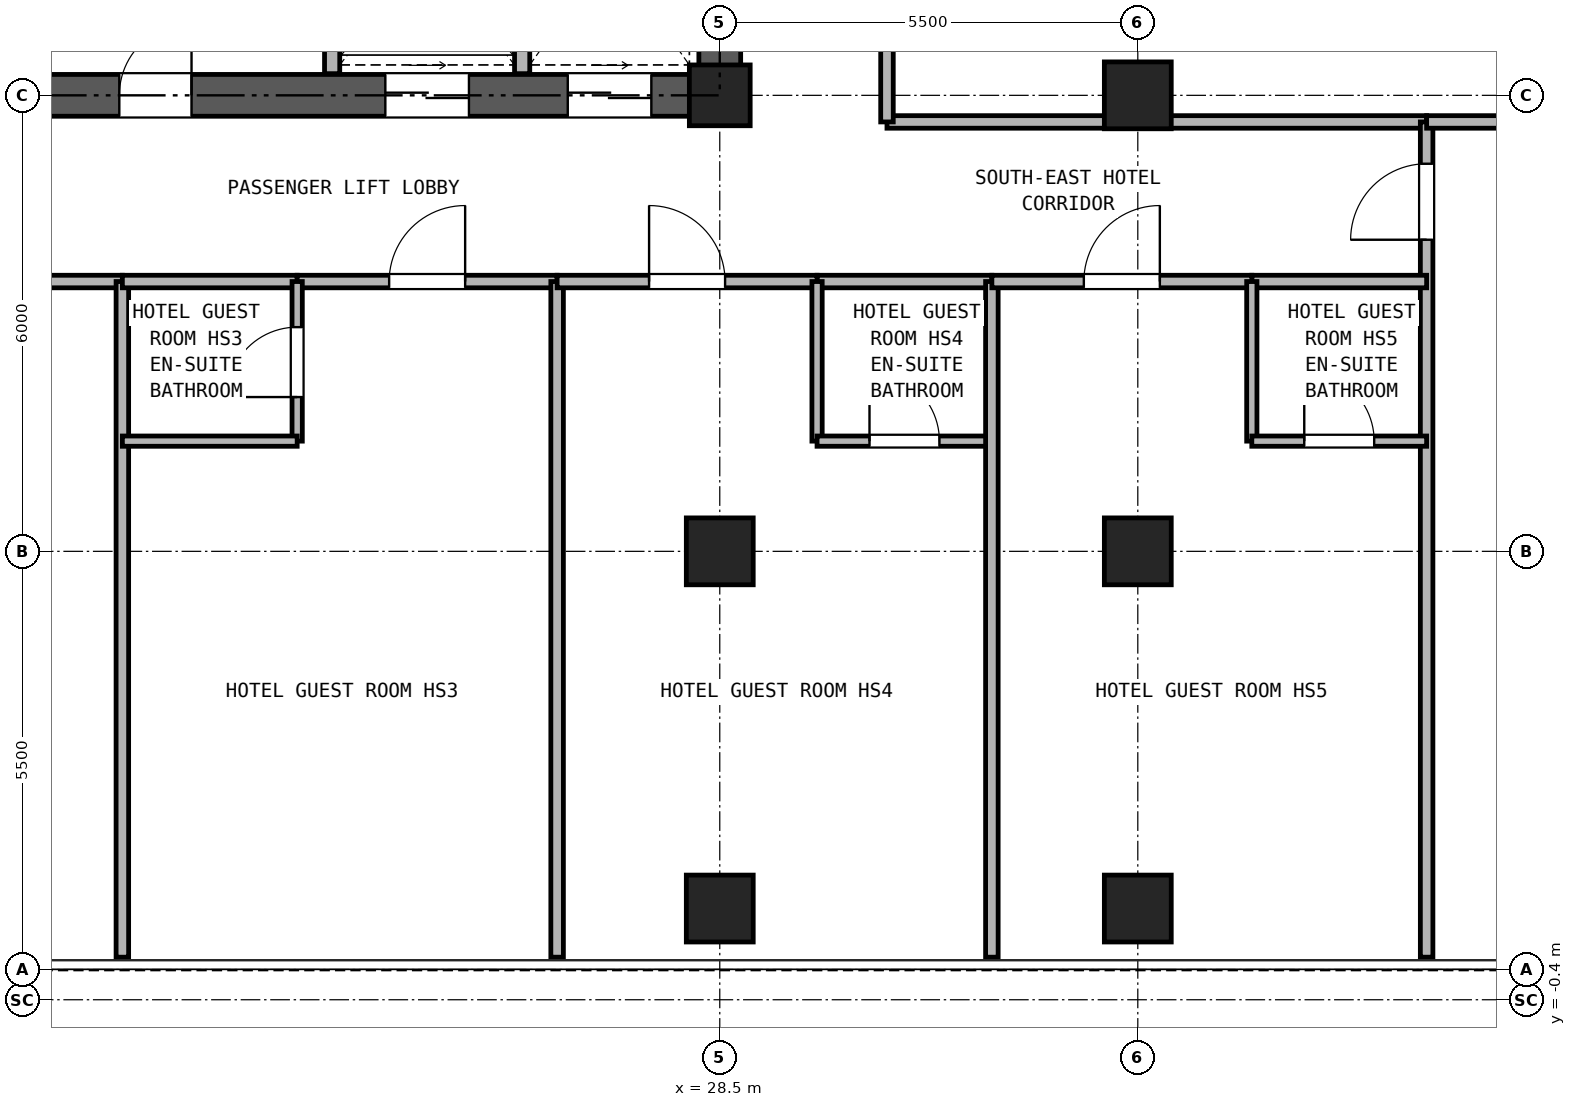
"""IFC4 building model, lengths in metres.
Left out: names, types, materials, properties, quantities, classifications, styles, units other than length and angle.
Written with IfcOpenShell. Run it as: python <this file> out.ifc"""

import sys

from ifc_helpers import new_model, si_unit, direction, frame, frame_2d, origin, origin_2d, place, context, subcontext, project, spatial, rectangle, hollow_rectangle, extrude, source, transform, mapped, element, fill, save


model = new_model("IFC4")
c1 = context("Model", 3, precision=1e-05, world=origin(), true_north=direction((0.0, 1.0)))
c2 = subcontext(c1, "Body", "Model", "MODEL_VIEW")
j1 = project(units=[si_unit("LENGTHUNIT", "METRE"), si_unit("PLANEANGLEUNIT", "RADIAN")], contexts=[c1])
p1 = place(None, origin())
s1 = spatial("IfcSite", under=j1, at=p1, CompositionType="ELEMENT")
p2 = place(p1, origin())
s2 = spatial("IfcBuilding", under=s1, at=p2, CompositionType="ELEMENT")
p3 = place(p2, frame((0.0, 0.0, 99.1)))
s3 = spatial("IfcBuildingStorey", under=s2, at=p3, CompositionType="ELEMENT", Elevation=99.1)
m1 = source(origin(), c2, "Body", "SweptSolid", [
    extrude(hollow_rectangle(XDim=0.88, YDim=0.88, WallThickness=0.05, at=origin_2d()), origin(), (0.0, 0.0, 1.0), 2.95),
])
for number, where, z_axis, x_axis in (
    (1, (28.5, 0.8, 0.0), (0.0, 0.0, 1.0), (1.0, 0.0, 0.0)),
    (2, (34.0, 0.8, 0.0), (0.0, 0.0, 1.0), (1.0, 0.0, 0.0)),
    (3, (28.5, 5.5, 0.0), (0.0, 0.0, 1.0), (1.0, 0.0, 0.0)),
):
    element("IfcColumn", number, at=place(p3, frame(where, z_axis=z_axis, x_axis=x_axis)), inside=s3, PredefinedType="COLUMN", context=c2, shape_type="MappedRepresentation", body=[
        mapped(m1, transform((0.0, 0.0, 0.0), x_axis=(1.0, 0.0, 0.0), y_axis=(0.0, 1.0, 0.0), z_axis=(0.0, 0.0, 1.0), scale=1.0)),
    ])
m2 = source(origin(), c2, "Body", "SweptSolid", [
    extrude(hollow_rectangle(XDim=0.8, YDim=0.8, WallThickness=0.045, at=origin_2d()), origin(), (0.0, 0.0, 1.0), 2.95),
])
p4 = place(p3, frame((28.5, 11.5, 0.0), z_axis=(0.0, 0.0, 1.0), x_axis=(1.0, 0.0, 0.0)))
e4 = element("IfcColumn", 4, at=p4, inside=s3, PredefinedType="COLUMN", context=c2, shape_type="MappedRepresentation", body=[
    mapped(m2, transform((0.0, 0.0, 0.0), x_axis=(1.0, 0.0, 0.0), y_axis=(0.0, 1.0, 0.0), z_axis=(0.0, 0.0, 1.0), scale=1.0)),
])
for number, where, z_axis, x_axis in (
    (5, (34.0, 5.5, 0.0), (0.0, 0.0, 1.0), (1.0, 0.0, 0.0)),
    (6, (34.0, 11.5, 0.0), (0.0, 0.0, 1.0), (1.0, 0.0, 0.0)),
):
    element("IfcColumn", number, at=place(p3, frame(where, z_axis=z_axis, x_axis=x_axis)), inside=s3, PredefinedType="COLUMN", context=c2, shape_type="MappedRepresentation", body=[
        mapped(m1, transform((0.0, 0.0, 0.0), x_axis=(1.0, 0.0, 0.0), y_axis=(0.0, 1.0, 0.0), z_axis=(0.0, 0.0, 1.0), scale=1.0)),
    ])
p5 = place(p3, frame((18.225, 11.5, 0.0), z_axis=(0.0, 0.0, 1.0), x_axis=(1.0, 0.0, 0.0)))
e7 = element("IfcWall", 7, at=p5, inside=s3, PredefinedType="SHEAR", context=c2, shape_type="SweptSolid", body=[
    extrude(rectangle(XDim=10.55, YDim=0.55, at=frame_2d((5.275, 0.0))), origin(), (0.0, 0.0, 1.0), 2.95),
])
p6 = place(p5, frame((2.375, 0.0, 0.0)))
e8 = element("IfcOpeningElement", 8, at=p6, cuts=e7, PredefinedType="OPENING", context=c2, shape_type="SweptSolid", body=[
    extrude(rectangle(XDim=0.95, YDim=2.15, at=frame_2d((0.475, 1.075))), frame((0.0, 0.285, 0.0), z_axis=(0.0, -1.0, 0.0), x_axis=(1.0, 0.0, 0.0)), (0.0, 0.0, 1.0), 0.57),
])
p7 = place(p5, frame((5.875, 0.0, 0.0)))
e9 = element("IfcOpeningElement", 9, at=p7, cuts=e7, PredefinedType="OPENING", context=c2, shape_type="SweptSolid", body=[
    extrude(rectangle(XDim=1.1, YDim=2.25, at=frame_2d((0.55, 1.125))), frame((0.0, 0.285, 0.0), z_axis=(0.0, -1.0, 0.0), x_axis=(1.0, 0.0, 0.0)), (0.0, 0.0, 1.0), 0.57),
])
p8 = place(p5, frame((8.275, 0.0, 0.0)))
e10 = element("IfcOpeningElement", 10, at=p8, cuts=e7, PredefinedType="OPENING", context=c2, shape_type="SweptSolid", body=[
    extrude(rectangle(XDim=1.1, YDim=2.25, at=frame_2d((0.55, 1.125))), frame((0.0, 0.285, 0.0), z_axis=(0.0, -1.0, 0.0), x_axis=(1.0, 0.0, 0.0)), (0.0, 0.0, 1.0), 0.57),
])
p9 = place(p3, frame((28.5, 11.775, 0.0), z_axis=(0.0, 0.0, 1.0), x_axis=(0.0, 1.0, 0.0)))
e11 = element("IfcWall", 11, at=p9, inside=s3, PredefinedType="SHEAR", context=c2, shape_type="SweptSolid", body=[
    extrude(rectangle(XDim=16.7, YDim=0.55, at=frame_2d((8.35, 0.0))), origin(), (0.0, 0.0, 1.0), 2.95),
])
p10 = place(p9, frame((7.375, 0.0, 0.0)))
e12 = element("IfcOpeningElement", 12, at=p10, cuts=e11, PredefinedType="OPENING", context=c2, shape_type="SweptSolid", body=[
    extrude(rectangle(XDim=1.15, YDim=2.2, at=frame_2d((0.575, 1.1))), frame((0.0, 0.285, 0.0), z_axis=(0.0, -1.0, 0.0), x_axis=(1.0, 0.0, 0.0)), (0.0, 0.0, 1.0), 0.57),
])
for number, where, z_axis, x_axis in (
    (13, (23.4, 11.785, 0.0), (0.0, 0.0, 1.0), (0.0, 1.0, 0.0)),
    (14, (25.9, 11.785, 0.0), (0.0, 0.0, 1.0), (0.0, 1.0, 0.0)),
):
    element("IfcWall", number, at=place(p3, frame(where, z_axis=z_axis, x_axis=x_axis)), inside=s3, PredefinedType="PARTITIONING", context=c2, shape_type="SweptSolid", body=[
        extrude(rectangle(XDim=3.215, YDim=0.2, at=frame_2d((1.607, 0.0))), origin(), (0.0, 0.0, 1.0), 2.95),
    ])
p11 = place(p3, frame((30.7, 11.15, 0.0), z_axis=(0.0, 0.0, 1.0), x_axis=(1.0, 0.0, 0.0)))
e15 = element("IfcWall", 15, at=p11, inside=s3, PredefinedType="PARTITIONING", context=c2, shape_type="SweptSolid", body=[
    extrude(rectangle(XDim=7.1, YDim=0.165, at=frame_2d((3.55, 0.0))), origin(), (0.0, 0.0, 1.0), 2.95),
])
p12 = place(p3, frame((30.7, 11.15, 0.0), z_axis=(0.0, 0.0, 1.0), x_axis=(0.0, 1.0, 0.0)))
e16 = element("IfcWall", 16, at=p12, inside=s3, PredefinedType="PARTITIONING", context=c2, shape_type="SweptSolid", body=[
    extrude(rectangle(XDim=18.6, YDim=0.165, at=frame_2d((9.3, 0.0))), origin(), (0.0, 0.0, 1.0), 2.95),
])
p13 = place(p12, frame((4.15, 0.0, 0.0)))
e17 = element("IfcOpeningElement", 17, at=p13, cuts=e16, PredefinedType="OPENING", context=c2, shape_type="SweptSolid", body=[
    extrude(rectangle(XDim=0.95, YDim=2.15, at=frame_2d((0.475, 1.075))), frame((0.0, 0.093, 0.0), z_axis=(0.0, -1.0, 0.0), x_axis=(1.0, 0.0, 0.0)), (0.0, 0.0, 1.0), 0.185),
])
p14 = place(p12, frame((13.45, 0.0, 0.0)))
e18 = element("IfcOpeningElement", 18, at=p14, cuts=e16, PredefinedType="OPENING", context=c2, shape_type="SweptSolid", body=[
    extrude(rectangle(XDim=0.95, YDim=2.15, at=frame_2d((0.475, 1.075))), frame((0.0, 0.093, 0.0), z_axis=(0.0, -1.0, 0.0), x_axis=(1.0, 0.0, 0.0)), (0.0, 0.0, 1.0), 0.185),
])
p15 = place(p3, frame((37.8, 0.16, 0.0), z_axis=(0.0, 0.0, 1.0), x_axis=(0.0, 1.0, 0.0)))
e19 = element("IfcWall", 19, at=p15, inside=s3, PredefinedType="PARTITIONING", context=c2, shape_type="SweptSolid", body=[
    extrude(rectangle(XDim=10.99, YDim=0.165, at=frame_2d((5.495, 0.0))), origin(), (0.0, 0.0, 1.0), 2.95),
])
p16 = place(p15, frame((9.44, 0.0, 0.0)))
e20 = element("IfcOpeningElement", 20, at=p16, cuts=e19, PredefinedType="OPENING", context=c2, shape_type="SweptSolid", body=[
    extrude(rectangle(XDim=1.0, YDim=2.15, at=frame_2d((0.5, 1.075))), frame((0.0, 0.093, 0.0), z_axis=(0.0, -1.0, 0.0), x_axis=(1.0, 0.0, 0.0)), (0.0, 0.0, 1.0), 0.185),
])
p17 = place(p3, frame((37.8, 11.15, 0.0), z_axis=(0.0, 0.0, 1.0), x_axis=(1.0, 0.0, 0.0)))
e21 = element("IfcWall", 21, at=p17, inside=s3, PredefinedType="PARTITIONING", context=c2, shape_type="SweptSolid", body=[
    extrude(rectangle(XDim=9.04, YDim=0.165, at=frame_2d((4.52, 0.0))), origin(), (0.0, 0.0, 1.0), 2.95),
])
p18 = place(p3, frame((17.22, 9.05, 0.0), z_axis=(0.0, 0.0, 1.0), x_axis=(1.0, 0.0, 0.0)))
e22 = element("IfcWall", 22, at=p18, inside=s3, PredefinedType="PARTITIONING", context=c2, shape_type="SweptSolid", body=[
    extrude(rectangle(XDim=3.42, YDim=0.165, at=frame_2d((1.71, 0.0))), origin(), (0.0, 0.0, 1.0), 2.95),
])
p19 = place(p18, frame((1.21, 0.0, 0.0)))
e23 = element("IfcOpeningElement", 23, at=p19, cuts=e22, PredefinedType="OPENING", context=c2, shape_type="SweptSolid", body=[
    extrude(rectangle(XDim=1.0, YDim=2.15, at=frame_2d((0.5, 1.075))), frame((0.0, 0.093, 0.0), z_axis=(0.0, -1.0, 0.0), x_axis=(1.0, 0.0, 0.0)), (0.0, 0.0, 1.0), 0.185),
])
p20 = place(p3, frame((20.64, 0.16, 0.0), z_axis=(0.0, 0.0, 1.0), x_axis=(0.0, 1.0, 0.0)))
e24 = element("IfcWall", 24, at=p20, inside=s3, PredefinedType="PARTITIONING", context=c2, shape_type="SweptSolid", body=[
    extrude(rectangle(XDim=8.89, YDim=0.165, at=frame_2d((4.445, 0.0))), origin(), (0.0, 0.0, 1.0), 2.95),
])
p21 = place(p3, frame((20.64, 9.05, 0.0), z_axis=(0.0, 0.0, 1.0), x_axis=(1.0, 0.0, 0.0)))
e25 = element("IfcWall", 25, at=p21, inside=s3, PredefinedType="PARTITIONING", context=c2, shape_type="SweptSolid", body=[
    extrude(rectangle(XDim=2.3, YDim=0.165, at=frame_2d((1.15, 0.0))), origin(), (0.0, 0.0, 1.0), 2.95),
])
p22 = place(p3, frame((22.94, 9.05, 0.0), z_axis=(0.0, 0.0, 1.0), x_axis=(1.0, 0.0, 0.0)))
e26 = element("IfcWall", 26, at=p22, inside=s3, PredefinedType="PARTITIONING", context=c2, shape_type="SweptSolid", body=[
    extrude(rectangle(XDim=3.42, YDim=0.165, at=frame_2d((1.71, 0.0))), origin(), (0.0, 0.0, 1.0), 2.95),
])
p23 = place(p22, frame((1.21, 0.0, 0.0)))
e27 = element("IfcOpeningElement", 27, at=p23, cuts=e26, PredefinedType="OPENING", context=c2, shape_type="SweptSolid", body=[
    extrude(rectangle(XDim=1.0, YDim=2.15, at=frame_2d((0.5, 1.075))), frame((0.0, 0.093, 0.0), z_axis=(0.0, -1.0, 0.0), x_axis=(1.0, 0.0, 0.0)), (0.0, 0.0, 1.0), 0.185),
])
p24 = place(p3, frame((22.94, 6.95, 0.0), z_axis=(0.0, 0.0, 1.0), x_axis=(0.0, 1.0, 0.0)))
e28 = element("IfcWall", 28, at=p24, inside=s3, PredefinedType="PARTITIONING", context=c2, shape_type="SweptSolid", body=[
    extrude(rectangle(XDim=2.1, YDim=0.135, at=frame_2d((1.05, 0.0))), origin(), (0.0, 0.0, 1.0), 2.95),
])
p25 = place(p24, frame((0.58, 0.0, 0.0)))
e29 = element("IfcOpeningElement", 29, at=p25, cuts=e28, PredefinedType="OPENING", context=c2, shape_type="SweptSolid", body=[
    extrude(rectangle(XDim=0.92, YDim=2.1, at=frame_2d((0.46, 1.05))), frame((0.0, 0.077, 0.0), z_axis=(0.0, -1.0, 0.0), x_axis=(1.0, 0.0, 0.0)), (0.0, 0.0, 1.0), 0.155),
])
p26 = place(p3, frame((20.64, 6.95, 0.0), z_axis=(0.0, 0.0, 1.0), x_axis=(1.0, 0.0, 0.0)))
e30 = element("IfcWall", 30, at=p26, inside=s3, PredefinedType="PARTITIONING", context=c2, shape_type="SweptSolid", body=[
    extrude(rectangle(XDim=2.3, YDim=0.135, at=frame_2d((1.15, 0.0))), origin(), (0.0, 0.0, 1.0), 2.95),
])
p27 = place(p3, frame((26.36, 0.16, 0.0), z_axis=(0.0, 0.0, 1.0), x_axis=(0.0, 1.0, 0.0)))
e31 = element("IfcWall", 31, at=p27, inside=s3, PredefinedType="PARTITIONING", context=c2, shape_type="SweptSolid", body=[
    extrude(rectangle(XDim=8.89, YDim=0.165, at=frame_2d((4.445, 0.0))), origin(), (0.0, 0.0, 1.0), 2.95),
])
p28 = place(p3, frame((29.78, 9.05, 0.0), z_axis=(0.0, 0.0, 1.0), x_axis=(1.0, 0.0, 0.0)))
e32 = element("IfcWall", 32, at=p28, inside=s3, PredefinedType="PARTITIONING", context=c2, shape_type="SweptSolid", body=[
    extrude(rectangle(XDim=2.3, YDim=0.165, at=frame_2d((1.15, 0.0))), origin(), (0.0, 0.0, 1.0), 2.95),
])
p29 = place(p3, frame((26.36, 9.05, 0.0), z_axis=(0.0, 0.0, 1.0), x_axis=(1.0, 0.0, 0.0)))
e33 = element("IfcWall", 33, at=p29, inside=s3, PredefinedType="PARTITIONING", context=c2, shape_type="SweptSolid", body=[
    extrude(rectangle(XDim=3.42, YDim=0.165, at=frame_2d((1.71, 0.0))), origin(), (0.0, 0.0, 1.0), 2.95),
])
p30 = place(p29, frame((1.21, 0.0, 0.0)))
e34 = element("IfcOpeningElement", 34, at=p30, cuts=e33, PredefinedType="OPENING", context=c2, shape_type="SweptSolid", body=[
    extrude(rectangle(XDim=1.0, YDim=2.15, at=frame_2d((0.5, 1.075))), frame((0.0, 0.093, 0.0), z_axis=(0.0, -1.0, 0.0), x_axis=(1.0, 0.0, 0.0)), (0.0, 0.0, 1.0), 0.185),
])
p31 = place(p3, frame((29.78, 6.95, 0.0), z_axis=(0.0, 0.0, 1.0), x_axis=(0.0, 1.0, 0.0)))
e35 = element("IfcWall", 35, at=p31, inside=s3, PredefinedType="PARTITIONING", context=c2, shape_type="SweptSolid", body=[
    extrude(rectangle(XDim=2.1, YDim=0.135, at=frame_2d((1.05, 0.0))), origin(), (0.0, 0.0, 1.0), 2.95),
])
p32 = place(p3, frame((29.78, 6.95, 0.0), z_axis=(0.0, 0.0, 1.0), x_axis=(1.0, 0.0, 0.0)))
e36 = element("IfcWall", 36, at=p32, inside=s3, PredefinedType="PARTITIONING", context=c2, shape_type="SweptSolid", body=[
    extrude(rectangle(XDim=2.3, YDim=0.135, at=frame_2d((1.15, 0.0))), origin(), (0.0, 0.0, 1.0), 2.95),
])
p33 = place(p32, frame((0.69, 0.0, 0.0)))
e37 = element("IfcOpeningElement", 37, at=p33, cuts=e36, PredefinedType="OPENING", context=c2, shape_type="SweptSolid", body=[
    extrude(rectangle(XDim=0.92, YDim=2.1, at=frame_2d((0.46, 1.05))), frame((0.0, 0.077, 0.0), z_axis=(0.0, -1.0, 0.0), x_axis=(1.0, 0.0, 0.0)), (0.0, 0.0, 1.0), 0.155),
])
p34 = place(p3, frame((32.08, 0.16, 0.0), z_axis=(0.0, 0.0, 1.0), x_axis=(0.0, 1.0, 0.0)))
e38 = element("IfcWall", 38, at=p34, inside=s3, PredefinedType="PARTITIONING", context=c2, shape_type="SweptSolid", body=[
    extrude(rectangle(XDim=8.89, YDim=0.165, at=frame_2d((4.445, 0.0))), origin(), (0.0, 0.0, 1.0), 2.95),
])
p35 = place(p3, frame((35.5, 9.05, 0.0), z_axis=(0.0, 0.0, 1.0), x_axis=(1.0, 0.0, 0.0)))
e39 = element("IfcWall", 39, at=p35, inside=s3, PredefinedType="PARTITIONING", context=c2, shape_type="SweptSolid", body=[
    extrude(rectangle(XDim=2.3, YDim=0.165, at=frame_2d((1.15, 0.0))), origin(), (0.0, 0.0, 1.0), 2.95),
])
p36 = place(p3, frame((32.08, 9.05, 0.0), z_axis=(0.0, 0.0, 1.0), x_axis=(1.0, 0.0, 0.0)))
e40 = element("IfcWall", 40, at=p36, inside=s3, PredefinedType="PARTITIONING", context=c2, shape_type="SweptSolid", body=[
    extrude(rectangle(XDim=3.42, YDim=0.165, at=frame_2d((1.71, 0.0))), origin(), (0.0, 0.0, 1.0), 2.95),
])
p37 = place(p36, frame((1.21, 0.0, 0.0)))
e41 = element("IfcOpeningElement", 41, at=p37, cuts=e40, PredefinedType="OPENING", context=c2, shape_type="SweptSolid", body=[
    extrude(rectangle(XDim=1.0, YDim=2.15, at=frame_2d((0.5, 1.075))), frame((0.0, 0.093, 0.0), z_axis=(0.0, -1.0, 0.0), x_axis=(1.0, 0.0, 0.0)), (0.0, 0.0, 1.0), 0.185),
])
p38 = place(p3, frame((35.5, 6.95, 0.0), z_axis=(0.0, 0.0, 1.0), x_axis=(0.0, 1.0, 0.0)))
e42 = element("IfcWall", 42, at=p38, inside=s3, PredefinedType="PARTITIONING", context=c2, shape_type="SweptSolid", body=[
    extrude(rectangle(XDim=2.1, YDim=0.135, at=frame_2d((1.05, 0.0))), origin(), (0.0, 0.0, 1.0), 2.95),
])
p39 = place(p3, frame((35.5, 6.95, 0.0), z_axis=(0.0, 0.0, 1.0), x_axis=(1.0, 0.0, 0.0)))
e43 = element("IfcWall", 43, at=p39, inside=s3, PredefinedType="PARTITIONING", context=c2, shape_type="SweptSolid", body=[
    extrude(rectangle(XDim=2.3, YDim=0.135, at=frame_2d((1.15, 0.0))), origin(), (0.0, 0.0, 1.0), 2.95),
])
p40 = place(p39, frame((0.69, 0.0, 0.0)))
e44 = element("IfcOpeningElement", 44, at=p40, cuts=e43, PredefinedType="OPENING", context=c2, shape_type="SweptSolid", body=[
    extrude(rectangle(XDim=0.92, YDim=2.1, at=frame_2d((0.46, 1.05))), frame((0.0, 0.077, 0.0), z_axis=(0.0, -1.0, 0.0), x_axis=(1.0, 0.0, 0.0)), (0.0, 0.0, 1.0), 0.155),
])
p41 = place(p6, frame((0.95, 0.0, 0.0), z_axis=(0.0, 0.0, 1.0), x_axis=(-1.0, 0.0, 0.0)))
e45 = element("IfcDoor", 45, at=p41, inside=s3, OperationType="SINGLE_SWING_RIGHT", PredefinedType="DOOR", context=c2, shape_type="SweptSolid", body=[
    extrude(rectangle(XDim=0.95, YDim=2.15, at=frame_2d((0.475, 1.075))), frame((0.0, 0.025, 0.0), z_axis=(0.0, -1.0, 0.0), x_axis=(1.0, 0.0, 0.0)), (0.0, 0.0, 1.0), 0.05),
])
fill(e8, e45)
p42 = place(p7, frame((1.1, 0.0, 0.0), z_axis=(0.0, 0.0, 1.0), x_axis=(-1.0, 0.0, 0.0)))
e46 = element("IfcDoor", 46, at=p42, inside=s3, OperationType="DOUBLE_DOOR_SLIDING", PredefinedType="DOOR", context=c2, shape_type="SweptSolid", body=[
    extrude(rectangle(XDim=1.1, YDim=2.25, at=frame_2d((0.55, 1.125))), frame((0.0, 0.025, 0.0), z_axis=(0.0, -1.0, 0.0), x_axis=(1.0, 0.0, 0.0)), (0.0, 0.0, 1.0), 0.05),
])
fill(e9, e46)
p43 = place(p8, frame((1.1, 0.0, 0.0), z_axis=(0.0, 0.0, 1.0), x_axis=(-1.0, 0.0, 0.0)))
e47 = element("IfcDoor", 47, at=p43, inside=s3, OperationType="DOUBLE_DOOR_SLIDING", PredefinedType="DOOR", context=c2, shape_type="SweptSolid", body=[
    extrude(rectangle(XDim=1.1, YDim=2.25, at=frame_2d((0.55, 1.125))), frame((0.0, 0.025, 0.0), z_axis=(0.0, -1.0, 0.0), x_axis=(1.0, 0.0, 0.0)), (0.0, 0.0, 1.0), 0.05),
])
fill(e10, e47)
p44 = place(p16, frame((1.0, 0.0, 0.0), z_axis=(0.0, 0.0, 1.0), x_axis=(-1.0, 0.0, 0.0)))
e48 = element("IfcDoor", 48, at=p44, inside=s3, OperationType="SINGLE_SWING_LEFT", PredefinedType="DOOR", context=c2, shape_type="SweptSolid", body=[
    extrude(rectangle(XDim=1.0, YDim=2.15, at=frame_2d((0.5, 1.075))), frame((0.0, 0.025, 0.0), z_axis=(0.0, -1.0, 0.0), x_axis=(1.0, 0.0, 0.0)), (0.0, 0.0, 1.0), 0.05),
])
fill(e20, e48)
p45 = place(p25, frame((0.92, 0.0, 0.0), z_axis=(0.0, 0.0, 1.0), x_axis=(-1.0, 0.0, 0.0)))
e49 = element("IfcDoor", 49, at=p45, inside=s3, OperationType="SINGLE_SWING_LEFT", PredefinedType="DOOR", context=c2, shape_type="SweptSolid", body=[
    extrude(rectangle(XDim=0.92, YDim=2.1, at=frame_2d((0.46, 1.05))), frame((0.0, 0.025, 0.0), z_axis=(0.0, -1.0, 0.0), x_axis=(1.0, 0.0, 0.0)), (0.0, 0.0, 1.0), 0.05),
])
fill(e29, e49)
p46 = place(p23, frame((1.0, 0.0, 0.0), z_axis=(0.0, 0.0, 1.0), x_axis=(-1.0, 0.0, 0.0)))
e50 = element("IfcDoor", 50, at=p46, inside=s3, OperationType="SINGLE_SWING_RIGHT", PredefinedType="DOOR", context=c2, shape_type="SweptSolid", body=[
    extrude(rectangle(XDim=1.0, YDim=2.15, at=frame_2d((0.5, 1.075))), frame((0.0, 0.025, 0.0), z_axis=(0.0, -1.0, 0.0), x_axis=(1.0, 0.0, 0.0)), (0.0, 0.0, 1.0), 0.05),
])
fill(e27, e50)
p47 = place(p33, origin())
e51 = element("IfcDoor", 51, at=p47, inside=s3, OperationType="SINGLE_SWING_LEFT", PredefinedType="DOOR", context=c2, shape_type="SweptSolid", body=[
    extrude(rectangle(XDim=0.92, YDim=2.1, at=frame_2d((0.46, 1.05))), frame((0.0, 0.025, 0.0), z_axis=(0.0, -1.0, 0.0), x_axis=(1.0, 0.0, 0.0)), (0.0, 0.0, 1.0), 0.05),
])
fill(e37, e51)
p48 = place(p30, frame((1.0, 0.0, 0.0), z_axis=(0.0, 0.0, 1.0), x_axis=(-1.0, 0.0, 0.0)))
e52 = element("IfcDoor", 52, at=p48, inside=s3, OperationType="SINGLE_SWING_LEFT", PredefinedType="DOOR", context=c2, shape_type="SweptSolid", body=[
    extrude(rectangle(XDim=1.0, YDim=2.15, at=frame_2d((0.5, 1.075))), frame((0.0, 0.025, 0.0), z_axis=(0.0, -1.0, 0.0), x_axis=(1.0, 0.0, 0.0)), (0.0, 0.0, 1.0), 0.05),
])
fill(e34, e52)
p49 = place(p40, origin())
e53 = element("IfcDoor", 53, at=p49, inside=s3, OperationType="SINGLE_SWING_LEFT", PredefinedType="DOOR", context=c2, shape_type="SweptSolid", body=[
    extrude(rectangle(XDim=0.92, YDim=2.1, at=frame_2d((0.46, 1.05))), frame((0.0, 0.025, 0.0), z_axis=(0.0, -1.0, 0.0), x_axis=(1.0, 0.0, 0.0)), (0.0, 0.0, 1.0), 0.05),
])
fill(e44, e53)
p50 = place(p37, frame((1.0, 0.0, 0.0), z_axis=(0.0, 0.0, 1.0), x_axis=(-1.0, 0.0, 0.0)))
e54 = element("IfcDoor", 54, at=p50, inside=s3, OperationType="SINGLE_SWING_RIGHT", PredefinedType="DOOR", context=c2, shape_type="SweptSolid", body=[
    extrude(rectangle(XDim=1.0, YDim=2.15, at=frame_2d((0.5, 1.075))), frame((0.0, 0.025, 0.0), z_axis=(0.0, -1.0, 0.0), x_axis=(1.0, 0.0, 0.0)), (0.0, 0.0, 1.0), 0.05),
])
fill(e41, e54)
save(model, sys.argv[1])
